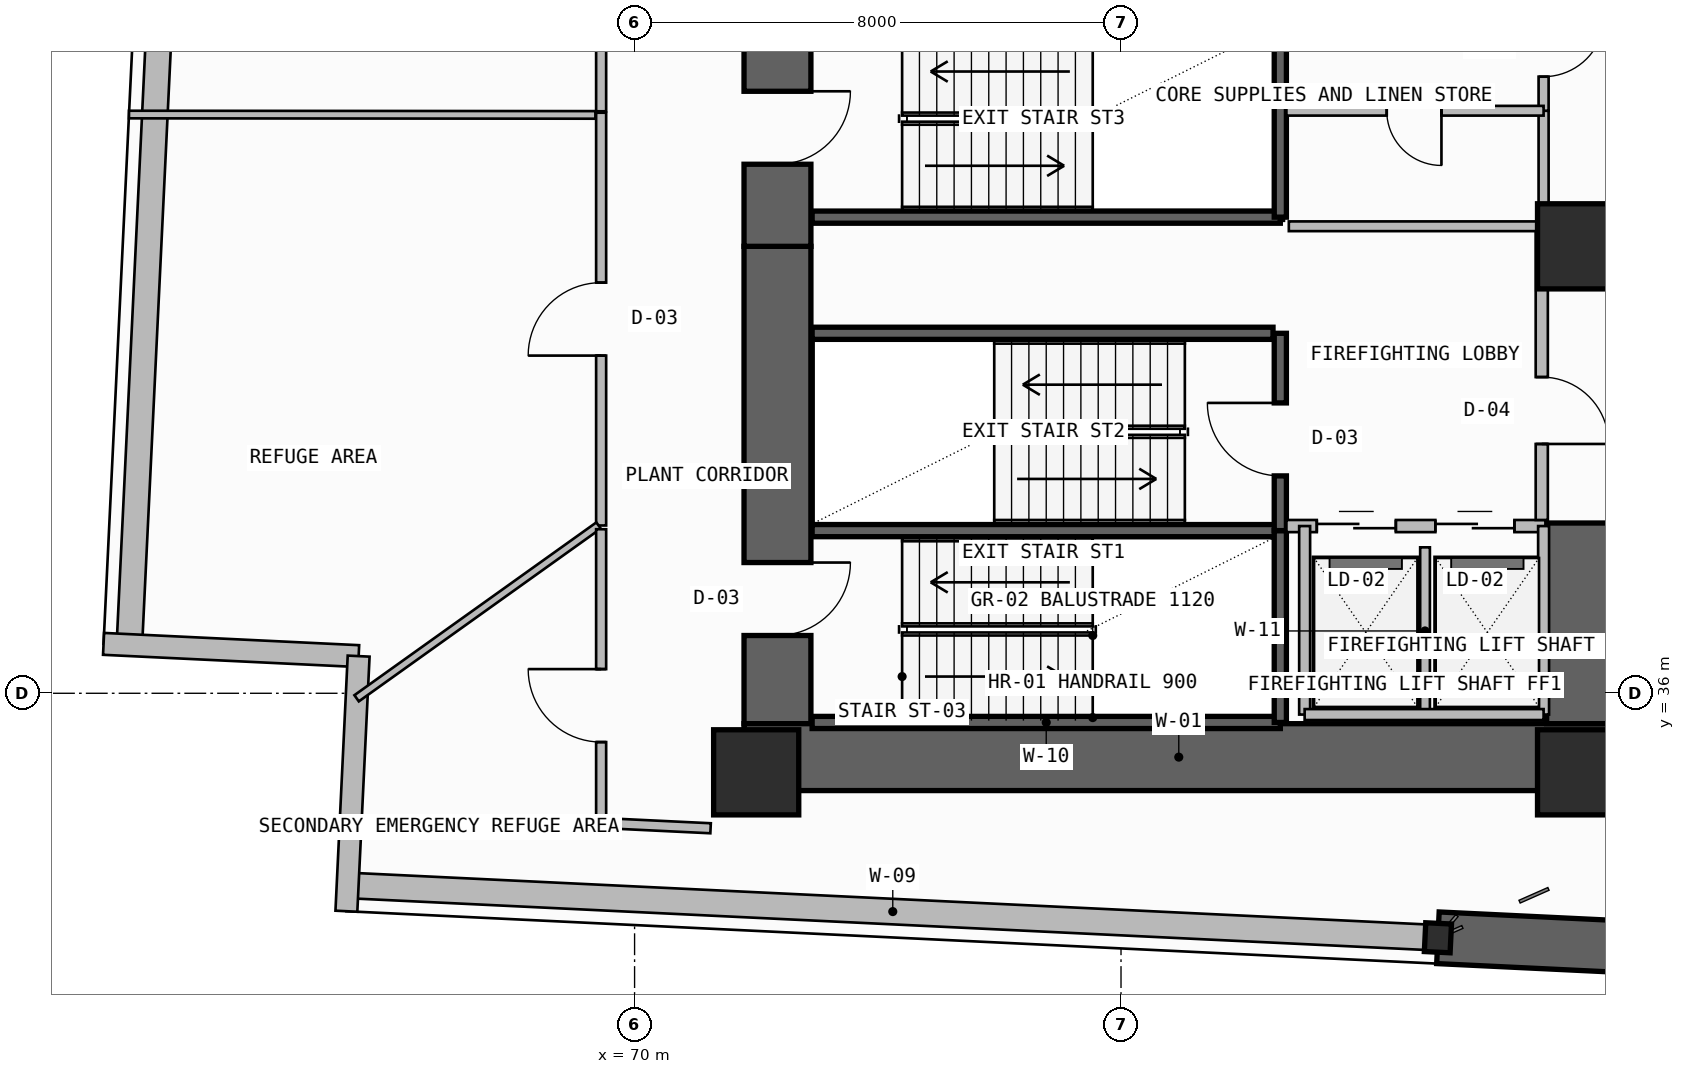
"""IFC4 building model, lengths in metres.
Left out: names, types, materials, properties, quantities, classifications, styles, units other than length and angle.
Written with IfcOpenShell. Run it as: python <this file> out.ifc"""

import sys

from ifc_helpers import new_model, si_unit, direction, frame, frame_2d, origin, origin_2d, place, context, subcontext, project, spatial, rectangle, i_section, extrude, element, fill, save


model = new_model("IFC4")
c1 = context("Model", 3, precision=1e-05, world=origin(), true_north=direction((0.0, 1.0)))
c2 = subcontext(c1, "Body", "Model", "MODEL_VIEW")
j1 = project(units=[si_unit("LENGTHUNIT", "METRE"), si_unit("PLANEANGLEUNIT", "RADIAN")], contexts=[c1])
p1 = place(None, origin())
s1 = spatial("IfcSite", under=j1, at=p1, CompositionType="ELEMENT")
p2 = place(p1, origin())
s2 = spatial("IfcBuilding", under=s1, at=p2, CompositionType="ELEMENT")
p3 = place(p2, frame((0.0, 0.0, 59.1)))
s3 = spatial("IfcBuildingStorey", under=s2, at=p3, CompositionType="ELEMENT", Elevation=59.1)
p4 = place(p3, frame((72.35, 35.5, -0.5), z_axis=(0.0, 0.0, 1.0), x_axis=(0.0, 1.0, 0.0)))
e1 = element("IfcWall", 1, at=p4, inside=s3, PredefinedType="SHEAR", context=c2, shape_type="SweptSolid", body=[
    extrude(rectangle(XDim=7.85, YDim=1.1, at=frame_2d((3.925, 0.0))), origin(), (0.0, 0.0, 1.0), 4.3),
])
p5 = place(p4, frame((1.45, 0.0, 0.5)))
e2 = element("IfcOpeningElement", 2, at=p5, cuts=e1, PredefinedType="OPENING", context=c2, shape_type="SweptSolid", body=[
    extrude(rectangle(XDim=1.2, YDim=2.2, at=frame_2d((0.6, 1.1))), frame((0.0, 0.56, 0.0), z_axis=(0.0, -1.0, 0.0), x_axis=(1.0, 0.0, 0.0)), (0.0, 0.0, 1.0), 1.12),
])
p6 = place(p3, frame((71.8, 34.95, -0.5), z_axis=(0.0, 0.0, 1.0), x_axis=(1.0, 0.0, 0.0)))
e3 = element("IfcWall", 3, at=p6, inside=s3, PredefinedType="SHEAR", context=c2, shape_type="SweptSolid", body=[
    extrude(rectangle(XDim=14.3, YDim=1.1, at=frame_2d((7.15, 0.0))), origin(), (0.0, 0.0, 1.0), 4.3),
])
p7 = place(p3, frame((85.55, 35.5, -0.5), z_axis=(0.0, 0.0, 1.0), x_axis=(0.0, 1.0, 0.0)))
e4 = element("IfcWall", 4, at=p7, inside=s3, PredefinedType="SHEAR", context=c2, shape_type="SweptSolid", body=[
    extrude(rectangle(XDim=3.3, YDim=1.1, at=frame_2d((1.65, 0.0))), origin(), (0.0, 0.0, 1.0), 4.3),
])
p8 = place(p3, frame((72.35, 43.35, -0.5), z_axis=(0.0, 0.0, 1.0), x_axis=(0.0, 1.0, 0.0)))
e5 = element("IfcWall", 5, at=p8, inside=s3, PredefinedType="SHEAR", context=c2, shape_type="SweptSolid", body=[
    extrude(rectangle(XDim=12.7, YDim=1.1, at=frame_2d((6.35, 0.0))), origin(), (0.0, 0.0, 1.0), 4.3),
])
p9 = place(p8, frame((1.35, 0.0, 0.5)))
e6 = element("IfcOpeningElement", 6, at=p9, cuts=e5, PredefinedType="OPENING", context=c2, shape_type="SweptSolid", body=[
    extrude(rectangle(XDim=1.2, YDim=2.2, at=frame_2d((0.6, 1.1))), frame((0.0, 0.56, 0.0), z_axis=(0.0, -1.0, 0.0), x_axis=(1.0, 0.0, 0.0)), (0.0, 0.0, 1.0), 1.12),
])
for number, where, z_axis, x_axis in (
    (7, (72.0, 34.7, 0.0), (0.0, 0.0, 1.0), (1.0, 0.0, 0.0)),
    (8, (85.55, 34.7, 0.0), (0.0, 0.0, 1.0), (1.0, 0.0, 0.0)),
    (9, (85.55, 43.35, 0.0), (0.0, 0.0, 1.0), (1.0, 0.0, 0.0)),
):
    element("IfcColumn", number, at=place(p3, frame(where, z_axis=z_axis, x_axis=x_axis)), inside=s3, PredefinedType="COLUMN", context=c2, shape_type="SweptSolid", body=[
        extrude(rectangle(XDim=1.4, YDim=1.4, at=origin_2d()), origin(), (0.0, 0.0, 1.0), 4.2),
    ])
p10 = place(p3, frame((83.212, 31.979, 0.0), z_axis=(0.0, 0.0, 1.0), x_axis=(-0.998848386485, 0.047978128521, 0.0)))
e10 = element("IfcColumn", 10, at=p10, inside=s3, PredefinedType="COLUMN", context=c2, shape_type="SweptSolid", body=[
    extrude(i_section(OverallWidth=0.424, OverallDepth=0.474, WebThickness=0.048, FlangeThickness=0.077, FilletRadius=0.015, at=origin_2d()), origin(), (0.0, 0.0, 1.0), 4.2),
])
p11 = place(p3, frame((65.281, 32.841, 0.0), z_axis=(0.0, 0.0, 1.0), x_axis=(0.998848298084, -0.047979968897, 0.0)))
e11 = element("IfcWall", 11, at=p11, inside=s3, PredefinedType="SOLIDWALL", context=c2, shape_type="SweptSolid", body=[
    extrude(rectangle(XDim=17.952, YDim=0.42, at=frame_2d((8.976, 0.0))), origin(), (0.0, 0.0, 1.0), 2.777),
])
p12 = place(p3, frame((83.212, 31.979, -0.5), z_axis=(0.0, 0.0, 1.0), x_axis=(0.998848235141, -0.047981279227, 0.0)))
e12 = element("IfcWall", 12, at=p12, inside=s3, PredefinedType="SHEAR", context=c2, shape_type="SweptSolid", body=[
    extrude(rectangle(XDim=27.456, YDim=0.85, at=frame_2d((13.728, 0.0))), origin(), (0.0, 0.0, 1.0), 4.3),
])
p13 = place(p3, frame((62.378, 51.09, 0.0), z_axis=(0.0, 0.0, 1.0), x_axis=(-0.047978424452, -0.99884837227, 0.0)))
e13 = element("IfcWall", 13, at=p13, inside=s3, PredefinedType="SOLIDWALL", context=c2, shape_type="SweptSolid", body=[
    extrude(rectangle(XDim=14.314, YDim=0.42, at=frame_2d((7.157, 0.0))), origin(), (0.0, 0.0, 1.0), 2.777),
])
p14 = place(p3, frame((61.267, 36.812, 0.0), z_axis=(0.0, 0.0, 1.0), x_axis=(0.998849519138, -0.047954542207, 0.0)))
e14 = element("IfcWall", 14, at=p14, inside=s3, PredefinedType="SOLIDWALL", context=c2, shape_type="SweptSolid", body=[
    extrude(rectangle(XDim=4.2, YDim=0.36, at=frame_2d((2.1, 0.0))), origin(), (0.0, 0.0, 1.0), 3.8),
])
p15 = place(p3, frame((65.462, 36.611, 0.0), z_axis=(0.0, 0.0, 1.0), x_axis=(-0.048015322758, -0.998846599224, 0.0)))
e15 = element("IfcWall", 15, at=p15, inside=s3, PredefinedType="SOLIDWALL", context=c2, shape_type="SweptSolid", body=[
    extrude(rectangle(XDim=4.2, YDim=0.36, at=frame_2d((2.1, 0.0))), origin(), (0.0, 0.0, 1.0), 3.8),
])
for number, where, z_axis, x_axis in (
    (16, (72.92, 35.52, -0.5), (0.0, 0.0, 1.0), (1.0, 0.0, 0.0)),
    (17, (72.92, 38.675, -0.5), (0.0, 0.0, 1.0), (1.0, 0.0, 0.0)),
):
    element("IfcWall", number, at=place(p3, frame(where, z_axis=z_axis, x_axis=x_axis)), inside=s3, PredefinedType="SOLIDWALL", context=c2, shape_type="SweptSolid", body=[
        extrude(rectangle(XDim=7.7, YDim=0.2, at=frame_2d((3.85, 0.0))), origin(), (0.0, 0.0, 1.0), 4.3),
    ])
p16 = place(p3, frame((80.62, 35.52, -0.5), z_axis=(0.0, 0.0, 1.0), x_axis=(0.0, 1.0, 0.0)))
e18 = element("IfcWall", 18, at=p16, inside=s3, PredefinedType="SOLIDWALL", context=c2, shape_type="SweptSolid", body=[
    extrude(rectangle(XDim=3.155, YDim=0.2, at=frame_2d((1.578, 0.0))), origin(), (0.0, 0.0, 1.0), 4.3),
])
p17 = place(p3, frame((80.62, 38.675, -0.5), z_axis=(0.0, 0.0, 1.0), x_axis=(0.0, 1.0, 0.0)))
e19 = element("IfcWall", 19, at=p17, inside=s3, PredefinedType="SOLIDWALL", context=c2, shape_type="SweptSolid", body=[
    extrude(rectangle(XDim=3.245, YDim=0.2, at=frame_2d((1.623, 0.0))), origin(), (0.0, 0.0, 1.0), 4.3),
])
p18 = place(p17, frame((0.9, 0.0, 0.5)))
e20 = element("IfcOpeningElement", 20, at=p18, cuts=e19, PredefinedType="OPENING", context=c2, shape_type="SweptSolid", body=[
    extrude(rectangle(XDim=1.2, YDim=2.2, at=frame_2d((0.6, 1.1))), frame((0.0, 0.11, 0.0), z_axis=(0.0, -1.0, 0.0), x_axis=(1.0, 0.0, 0.0)), (0.0, 0.0, 1.0), 0.22),
])
p19 = place(p3, frame((80.72, 38.75, 0.0), z_axis=(0.0, 0.0, 1.0), x_axis=(1.0, 0.0, 0.0)))
e21 = element("IfcWall", 21, at=p19, inside=s3, PredefinedType="SOLIDWALL", context=c2, shape_type="SweptSolid", body=[
    extrude(rectangle(XDim=4.26, YDim=0.2, at=frame_2d((2.13, 0.0))), origin(), (0.0, 0.0, 1.0), 3.8),
])
p20 = place(p19, frame((0.5, 0.0, 0.0)))
e22 = element("IfcOpeningElement", 22, at=p20, cuts=e21, PredefinedType="OPENING", context=c2, shape_type="SweptSolid", body=[
    extrude(rectangle(XDim=1.3, YDim=2.3, at=frame_2d((0.65, 1.15))), frame((0.0, 0.11, 0.0), z_axis=(0.0, -1.0, 0.0), x_axis=(1.0, 0.0, 0.0)), (0.0, 0.0, 1.0), 0.22),
])
p21 = place(p19, frame((2.45, 0.0, 0.0)))
e23 = element("IfcOpeningElement", 23, at=p21, cuts=e21, PredefinedType="OPENING", context=c2, shape_type="SweptSolid", body=[
    extrude(rectangle(XDim=1.3, YDim=2.3, at=frame_2d((0.65, 1.15))), frame((0.0, 0.11, 0.0), z_axis=(0.0, -1.0, 0.0), x_axis=(1.0, 0.0, 0.0)), (0.0, 0.0, 1.0), 0.22),
])
p22 = place(p3, frame((83.0, 35.65, 0.0), z_axis=(0.0, 0.0, 1.0), x_axis=(0.0, 1.0, 0.0)))
e24 = element("IfcWall", 24, at=p22, inside=s3, PredefinedType="PLUMBINGWALL", context=c2, shape_type="SweptSolid", body=[
    extrude(rectangle(XDim=2.75, YDim=0.16, at=frame_2d((1.375, 0.0))), origin(), (0.0, 0.0, 1.0), 3.8),
])
for number, where, z_axis, x_axis in (
    (25, (84.95, 35.65, 0.0), (0.0, 0.0, 1.0), (0.0, 1.0, 0.0)),
    (26, (81.02, 35.65, 0.0), (0.0, 0.0, 1.0), (0.0, 1.0, 0.0)),
):
    element("IfcWall", number, at=place(p3, frame(where, z_axis=z_axis, x_axis=x_axis)), inside=s3, PredefinedType="SOLIDWALL", context=c2, shape_type="SweptSolid", body=[
        extrude(rectangle(XDim=3.1, YDim=0.18, at=frame_2d((1.55, 0.0))), origin(), (0.0, 0.0, 1.0), 3.8),
    ])
p23 = place(p3, frame((81.02, 35.65, 0.0), z_axis=(0.0, 0.0, 1.0), x_axis=(1.0, 0.0, 0.0)))
e27 = element("IfcWall", 27, at=p23, inside=s3, PredefinedType="SOLIDWALL", context=c2, shape_type="SweptSolid", body=[
    extrude(rectangle(XDim=3.93, YDim=0.18, at=frame_2d((1.965, 0.0))), origin(), (0.0, 0.0, 1.0), 3.8),
])
p24 = place(p3, frame((84.92, 38.85, 0.0), z_axis=(0.0, 0.0, 1.0), x_axis=(0.0, 1.0, 0.0)))
e28 = element("IfcWall", 28, at=p24, inside=s3, PredefinedType="SOLIDWALL", context=c2, shape_type="SweptSolid", body=[
    extrude(rectangle(XDim=4.83, YDim=0.2, at=frame_2d((2.415, 0.0))), origin(), (0.0, 0.0, 1.0), 3.8),
])
p25 = place(p24, frame((1.25, 0.0, 0.0)))
e29 = element("IfcOpeningElement", 29, at=p25, cuts=e28, PredefinedType="OPENING", context=c2, shape_type="SweptSolid", body=[
    extrude(rectangle(XDim=1.1, YDim=2.2, at=frame_2d((0.55, 1.1))), frame((0.0, 0.11, 0.0), z_axis=(0.0, -1.0, 0.0), x_axis=(1.0, 0.0, 0.0)), (0.0, 0.0, 1.0), 0.22),
])
p26 = place(p3, frame((72.92, 41.92, -0.5), z_axis=(0.0, 0.0, 1.0), x_axis=(1.0, 0.0, 0.0)))
e30 = element("IfcWall", 30, at=p26, inside=s3, PredefinedType="SOLIDWALL", context=c2, shape_type="SweptSolid", body=[
    extrude(rectangle(XDim=7.58, YDim=0.2, at=frame_2d((3.79, 0.0))), origin(), (0.0, 0.0, 1.0), 4.3),
])
p27 = place(p3, frame((72.92, 43.83, -0.5), z_axis=(0.0, 0.0, 1.0), x_axis=(1.0, 0.0, 0.0)))
e31 = element("IfcWall", 31, at=p27, inside=s3, PredefinedType="SOLIDWALL", context=c2, shape_type="SweptSolid", body=[
    extrude(rectangle(XDim=7.7, YDim=0.2, at=frame_2d((3.85, 0.0))), origin(), (0.0, 0.0, 1.0), 4.3),
])
p28 = place(p3, frame((80.62, 43.83, -0.5), z_axis=(0.0, 0.0, 1.0), x_axis=(0.0, 1.0, 0.0)))
e32 = element("IfcWall", 32, at=p28, inside=s3, PredefinedType="SOLIDWALL", context=c2, shape_type="SweptSolid", body=[
    extrude(rectangle(XDim=3.24, YDim=0.2, at=frame_2d((1.62, 0.0))), origin(), (0.0, 0.0, 1.0), 4.3),
])
p29 = place(p3, frame((84.95, 43.68, 0.0), z_axis=(0.0, 0.0, 1.0), x_axis=(0.0, 1.0, 0.0)))
e33 = element("IfcWall", 33, at=p29, inside=s3, PredefinedType="PLUMBINGWALL", context=c2, shape_type="SweptSolid", body=[
    extrude(rectangle(XDim=1.9, YDim=0.165, at=frame_2d((0.95, 0.0))), origin(), (0.0, 0.0, 1.0), 3.8),
])
p30 = place(p3, frame((84.95, 45.58, 0.0), z_axis=(0.0, 0.0, 1.0), x_axis=(0.0, 1.0, 0.0)))
e34 = element("IfcWall", 34, at=p30, inside=s3, PredefinedType="PARTITIONING", context=c2, shape_type="SweptSolid", body=[
    extrude(rectangle(XDim=2.12, YDim=0.165, at=frame_2d((1.06, 0.0))), origin(), (0.0, 0.0, 1.0), 3.8),
])
p31 = place(p30, frame((0.56, 0.0, 0.0)))
e35 = element("IfcOpeningElement", 35, at=p31, cuts=e34, PredefinedType="OPENING", context=c2, shape_type="SweptSolid", body=[
    extrude(rectangle(XDim=1.0, YDim=2.2, at=frame_2d((0.5, 1.1))), frame((0.0, 0.093, 0.0), z_axis=(0.0, -1.0, 0.0), x_axis=(1.0, 0.0, 0.0)), (0.0, 0.0, 1.0), 0.185),
])
p32 = place(p3, frame((80.72, 45.58, 0.0), z_axis=(0.0, 0.0, 1.0), x_axis=(1.0, 0.0, 0.0)))
e36 = element("IfcWall", 36, at=p32, inside=s3, PredefinedType="PLUMBINGWALL", context=c2, shape_type="SweptSolid", body=[
    extrude(rectangle(XDim=4.23, YDim=0.16, at=frame_2d((2.115, 0.0))), origin(), (0.0, 0.0, 1.0), 3.8),
])
p33 = place(p32, frame((1.65, 0.0, 0.0)))
e37 = element("IfcOpeningElement", 37, at=p33, cuts=e36, PredefinedType="OPENING", context=c2, shape_type="SweptSolid", body=[
    extrude(rectangle(XDim=0.9, YDim=2.1, at=frame_2d((0.45, 1.05))), frame((0.0, 0.09, 0.0), z_axis=(0.0, -1.0, 0.0), x_axis=(1.0, 0.0, 0.0)), (0.0, 0.0, 1.0), 0.18),
])
p34 = place(p3, frame((80.76, 43.68, 0.0), z_axis=(0.0, 0.0, 1.0), x_axis=(1.0, 0.0, 0.0)))
e38 = element("IfcWall", 38, at=p34, inside=s3, PredefinedType="PLUMBINGWALL", context=c2, shape_type="SweptSolid", body=[
    extrude(rectangle(XDim=4.19, YDim=0.16, at=frame_2d((2.095, 0.0))), origin(), (0.0, 0.0, 1.0), 3.8),
])
p35 = place(p3, frame((69.45, 45.547, 0.0), z_axis=(0.0, 0.0, 1.0), x_axis=(0.0, -1.0, 0.0)))
e39 = element("IfcWall", 39, at=p35, inside=s3, PredefinedType="PARTITIONING", context=c2, shape_type="SweptSolid", body=[
    extrude(rectangle(XDim=6.788, YDim=0.165, at=frame_2d((3.394, 0.0))), origin(), (0.0, 0.0, 1.0), 3.8),
])
p36 = place(p35, frame((2.794, 0.0, 0.0)))
e40 = element("IfcOpeningElement", 40, at=p36, cuts=e39, PredefinedType="OPENING", context=c2, shape_type="SweptSolid", body=[
    extrude(rectangle(XDim=1.2, YDim=2.2, at=frame_2d((0.6, 1.1))), frame((0.0, 0.093, 0.0), z_axis=(0.0, -1.0, 0.0), x_axis=(1.0, 0.0, 0.0)), (0.0, 0.0, 1.0), 0.185),
])
p37 = place(p3, frame((69.408, 38.759, 0.0), z_axis=(0.0, 0.0, 1.0), x_axis=(-0.813784071298, -0.581167347071, 0.0)))
e41 = element("IfcWall", 41, at=p37, inside=s3, PredefinedType="PARTITIONING", context=c2, shape_type="SweptSolid", body=[
    extrude(rectangle(XDim=4.89, YDim=0.125, at=frame_2d((2.445, 0.0))), origin(), (0.0, 0.0, 1.0), 3.8),
])
p38 = place(p3, frame((61.685, 45.518, 0.0), z_axis=(0.0, 0.0, 1.0), x_axis=(0.999999657602, -0.000827524463, 0.0)))
e42 = element("IfcWall", 42, at=p38, inside=s3, PredefinedType="PARTITIONING", context=c2, shape_type="SweptSolid", body=[
    extrude(rectangle(XDim=7.671, YDim=0.125, at=frame_2d((3.835, 0.0))), origin(), (0.0, 0.0, 1.0), 3.8),
])
p39 = place(p3, frame((69.45, 38.698, 0.0), z_axis=(0.0, 0.0, 1.0), x_axis=(0.0, -1.0, 0.0)))
e43 = element("IfcWall", 43, at=p39, inside=s3, PredefinedType="PARTITIONING", context=c2, shape_type="SweptSolid", body=[
    extrude(rectangle(XDim=4.831, YDim=0.165, at=frame_2d((2.416, 0.0))), origin(), (0.0, 0.0, 1.0), 3.8),
])
p40 = place(p39, frame((2.3, 0.0, 0.0)))
e44 = element("IfcOpeningElement", 44, at=p40, cuts=e43, PredefinedType="OPENING", context=c2, shape_type="SweptSolid", body=[
    extrude(rectangle(XDim=1.2, YDim=2.2, at=frame_2d((0.6, 1.1))), frame((0.0, 0.093, 0.0), z_axis=(0.0, -1.0, 0.0), x_axis=(1.0, 0.0, 0.0)), (0.0, 0.0, 1.0), 0.185),
])
p41 = place(p3, frame((69.45, 33.867, 0.0), z_axis=(0.0, 0.0, 1.0), x_axis=(0.998849363928, -0.047957774967, 0.0)))
e45 = element("IfcWall", 45, at=p41, inside=s3, PredefinedType="PARTITIONING", context=c2, shape_type="SweptSolid", body=[
    extrude(rectangle(XDim=1.802, YDim=0.165, at=frame_2d((0.901, 0.0))), origin(), (0.0, 0.0, 1.0), 3.8),
])
p42 = place(p3, frame((69.45, 52.316, 0.0), z_axis=(0.0, 0.0, 1.0), x_axis=(0.0, -1.0, 0.0)))
e46 = element("IfcWall", 46, at=p42, inside=s3, PredefinedType="PARTITIONING", context=c2, shape_type="SweptSolid", body=[
    extrude(rectangle(XDim=6.745, YDim=0.165, at=frame_2d((3.373, 0.0))), origin(), (0.0, 0.0, 1.0), 2.777),
])
p43 = place(p42, frame((2.623, 0.0, 0.0)))
e47 = element("IfcOpeningElement", 47, at=p43, cuts=e46, PredefinedType="OPENING", context=c2, shape_type="SweptSolid", body=[
    extrude(rectangle(XDim=1.5, YDim=2.25, at=frame_2d((0.75, 1.125))), frame((0.0, 0.093, 0.0), z_axis=(0.0, -1.0, 0.0), x_axis=(1.0, 0.0, 0.0)), (0.0, 0.0, 1.0), 0.185),
])
p44 = place(p5, frame((1.2, 0.0, 0.0), z_axis=(0.0, 0.0, 1.0), x_axis=(-1.0, 0.0, 0.0)))
e48 = element("IfcDoor", 48, at=p44, inside=s3, OperationType="SINGLE_SWING_LEFT", PredefinedType="USERDEFINED", context=c2, shape_type="SweptSolid", body=[
    extrude(rectangle(XDim=1.2, YDim=2.2, at=frame_2d((0.6, 1.1))), frame((0.0, 0.025, 0.0), z_axis=(0.0, -1.0, 0.0), x_axis=(1.0, 0.0, 0.0)), (0.0, 0.0, 1.0), 0.05),
])
fill(e2, e48)
p45 = place(p18, origin())
e49 = element("IfcDoor", 49, at=p45, inside=s3, OperationType="SINGLE_SWING_RIGHT", PredefinedType="USERDEFINED", context=c2, shape_type="SweptSolid", body=[
    extrude(rectangle(XDim=1.2, YDim=2.2, at=frame_2d((0.6, 1.1))), frame((0.0, 0.025, 0.0), z_axis=(0.0, -1.0, 0.0), x_axis=(1.0, 0.0, 0.0)), (0.0, 0.0, 1.0), 0.05),
])
fill(e20, e49)
p46 = place(p20, origin())
e50 = element("IfcDoor", 50, at=p46, inside=s3, OperationType="DOUBLE_DOOR_SLIDING", PredefinedType="DOOR", context=c2, shape_type="SweptSolid", body=[
    extrude(rectangle(XDim=1.3, YDim=2.3, at=frame_2d((0.65, 1.15))), frame((0.0, 0.025, 0.0), z_axis=(0.0, -1.0, 0.0), x_axis=(1.0, 0.0, 0.0)), (0.0, 0.0, 1.0), 0.05),
])
fill(e22, e50)
p47 = place(p21, origin())
e51 = element("IfcDoor", 51, at=p47, inside=s3, OperationType="DOUBLE_DOOR_SLIDING", PredefinedType="DOOR", context=c2, shape_type="SweptSolid", body=[
    extrude(rectangle(XDim=1.3, YDim=2.3, at=frame_2d((0.65, 1.15))), frame((0.0, 0.025, 0.0), z_axis=(0.0, -1.0, 0.0), x_axis=(1.0, 0.0, 0.0)), (0.0, 0.0, 1.0), 0.05),
])
fill(e23, e51)
p48 = place(p25, frame((1.1, 0.0, 0.0), z_axis=(0.0, 0.0, 1.0), x_axis=(-1.0, 0.0, 0.0)))
e52 = element("IfcDoor", 52, at=p48, inside=s3, OperationType="SINGLE_SWING_RIGHT", PredefinedType="DOOR", context=c2, shape_type="SweptSolid", body=[
    extrude(rectangle(XDim=1.1, YDim=2.2, at=frame_2d((0.55, 1.1))), frame((0.0, 0.025, 0.0), z_axis=(0.0, -1.0, 0.0), x_axis=(1.0, 0.0, 0.0)), (0.0, 0.0, 1.0), 0.05),
])
fill(e29, e52)
p49 = place(p9, frame((1.2, 0.0, 0.0), z_axis=(0.0, 0.0, 1.0), x_axis=(-1.0, 0.0, 0.0)))
e53 = element("IfcDoor", 53, at=p49, inside=s3, OperationType="SINGLE_SWING_LEFT", PredefinedType="USERDEFINED", context=c2, shape_type="SweptSolid", body=[
    extrude(rectangle(XDim=1.2, YDim=2.2, at=frame_2d((0.6, 1.1))), frame((0.0, 0.025, 0.0), z_axis=(0.0, -1.0, 0.0), x_axis=(1.0, 0.0, 0.0)), (0.0, 0.0, 1.0), 0.05),
])
fill(e6, e53)
p50 = place(p31, frame((1.0, 0.0, 0.0), z_axis=(0.0, 0.0, 1.0), x_axis=(-1.0, 0.0, 0.0)))
e54 = element("IfcDoor", 54, at=p50, inside=s3, OperationType="SINGLE_SWING_LEFT", PredefinedType="DOOR", context=c2, shape_type="SweptSolid", body=[
    extrude(rectangle(XDim=1.0, YDim=2.2, at=frame_2d((0.5, 1.1))), frame((0.0, 0.025, 0.0), z_axis=(0.0, -1.0, 0.0), x_axis=(1.0, 0.0, 0.0)), (0.0, 0.0, 1.0), 0.05),
])
fill(e35, e54)
p51 = place(p33, frame((0.9, 0.0, 0.0), z_axis=(0.0, 0.0, 1.0), x_axis=(-1.0, 0.0, 0.0)))
e55 = element("IfcDoor", 55, at=p51, inside=s3, OperationType="SINGLE_SWING_LEFT", PredefinedType="DOOR", context=c2, shape_type="SweptSolid", body=[
    extrude(rectangle(XDim=0.9, YDim=2.1, at=frame_2d((0.45, 1.05))), frame((0.0, 0.025, 0.0), z_axis=(0.0, -1.0, 0.0), x_axis=(1.0, 0.0, 0.0)), (0.0, 0.0, 1.0), 0.05),
])
fill(e37, e55)
p52 = place(p36, frame((1.2, 0.0, 0.0), z_axis=(0.0, 0.0, 1.0), x_axis=(-1.0, 0.0, 0.0)))
e56 = element("IfcDoor", 56, at=p52, inside=s3, OperationType="SINGLE_SWING_LEFT", PredefinedType="USERDEFINED", context=c2, shape_type="SweptSolid", body=[
    extrude(rectangle(XDim=1.2, YDim=2.2, at=frame_2d((0.6, 1.1))), frame((0.0, 0.025, 0.0), z_axis=(0.0, -1.0, 0.0), x_axis=(1.0, 0.0, 0.0)), (0.0, 0.0, 1.0), 0.05),
])
fill(e40, e56)
p53 = place(p40, frame((1.2, 0.0, 0.0), z_axis=(0.0, 0.0, 1.0), x_axis=(-1.0, 0.0, 0.0)))
e57 = element("IfcDoor", 57, at=p53, inside=s3, OperationType="SINGLE_SWING_RIGHT", PredefinedType="USERDEFINED", context=c2, shape_type="SweptSolid", body=[
    extrude(rectangle(XDim=1.2, YDim=2.2, at=frame_2d((0.6, 1.1))), frame((0.0, 0.025, 0.0), z_axis=(0.0, -1.0, 0.0), x_axis=(1.0, 0.0, 0.0)), (0.0, 0.0, 1.0), 0.05),
])
fill(e44, e57)
save(model, sys.argv[1])
